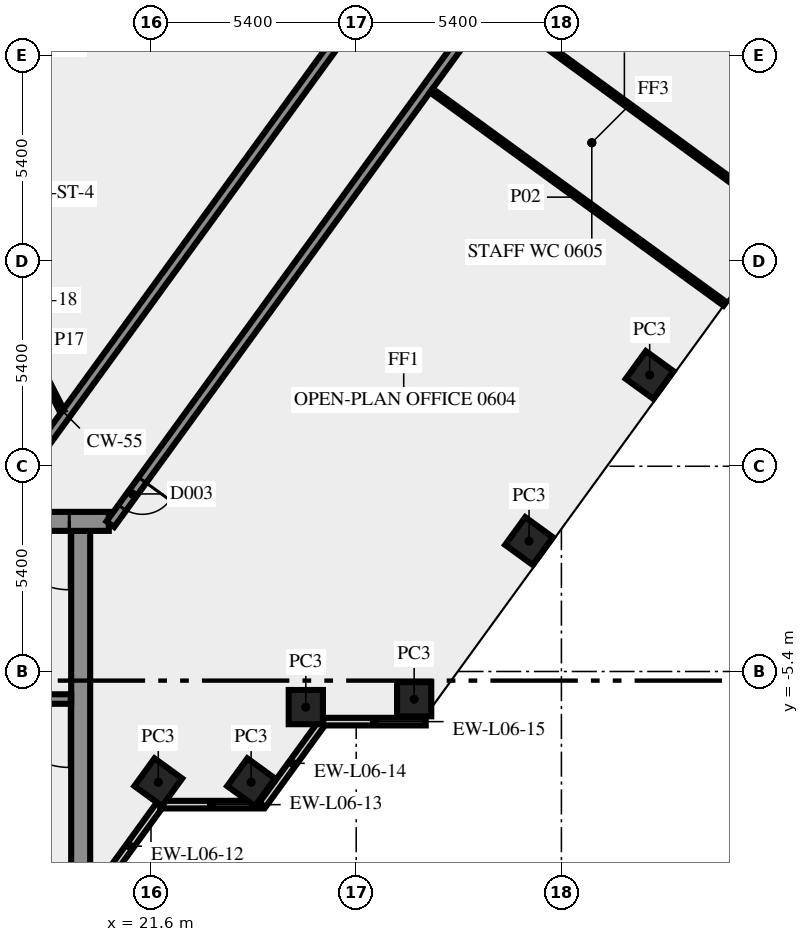
"""IFC4 building model, lengths in metres.
Left out: names, types, materials, properties, quantities, classifications, styles, units other than length and angle.
Written with IfcOpenShell. Run it as: python <this file> out.ifc"""

import sys

from ifc_helpers import new_model, si_unit, direction, frame, frame_2d, origin, origin_2d, place, context, subcontext, project, spatial, rectangle, extrude, element, fill, save


model = new_model("IFC4")
c1 = context("Model", 3, precision=1e-05, world=origin(), true_north=direction((0.0, 1.0)))
c2 = subcontext(c1, "Body", "Model", "MODEL_VIEW")
j1 = project(units=[si_unit("LENGTHUNIT", "METRE"), si_unit("PLANEANGLEUNIT", "RADIAN")], contexts=[c1])
p1 = place(None, origin())
s1 = spatial("IfcSite", under=j1, at=p1, CompositionType="ELEMENT")
p2 = place(p1, origin())
s2 = spatial("IfcBuilding", under=s1, at=p2, CompositionType="ELEMENT")
p3 = place(p2, frame((0.0, 0.0, 31.0)))
s3 = spatial("IfcBuildingStorey", under=s2, at=p3, CompositionType="ELEMENT", Elevation=31.0)
for number, where, z_axis, x_axis in (
    (1, (21.792, -8.315, 0.0), (0.0, 0.0, 1.0), (0.588, 0.809, 0.0)),
    (2, (24.235, -8.315, 0.0), (0.0, 0.0, 1.0), (0.588, 0.809, 0.0)),
    (3, (25.674, -6.337, 0.0), (0.0, 0.0, 1.0), (1.0, 0.0, 0.0)),
    (4, (28.525, -6.13, 0.0), (0.0, 0.0, 1.0), (1.0, 0.0, 0.0)),
    (5, (31.548, -1.969, 0.0), (0.0, 0.0, 1.0), (0.588, 0.809, 0.0)),
    (6, (34.722, 2.4, 0.0), (0.0, 0.0, 1.0), (0.588, 0.809, 0.0)),
):
    element("IfcColumn", number, at=place(p3, frame(where, z_axis=z_axis, x_axis=x_axis)), inside=s3, PredefinedType="COLUMN", context=c2, shape_type="SweptSolid", body=[
        extrude(rectangle(XDim=0.9, YDim=0.9, at=origin_2d()), origin(), (0.0, 0.0, 1.0), 3.65),
    ])
p4 = place(p3, frame((20.253, -11.083, 0.0), z_axis=(0.0, 0.0, 1.0), x_axis=(0.587766567315, 0.809030569476, 0.0)))
e7 = element("IfcWall", 7, at=p4, inside=s3, PredefinedType="SOLIDWALL", context=c2, shape_type="SweptSolid", body=[
    extrude(rectangle(XDim=2.688, YDim=0.2, at=frame_2d((1.344, 0.0))), origin(), (0.0, 0.0, 1.0), 3.65),
])
p5 = place(p3, frame((21.843, -8.904, 0.0), z_axis=(0.0, 0.0, 1.0), x_axis=(1.0, 0.0, 0.0)))
e8 = element("IfcWall", 8, at=p5, inside=s3, PredefinedType="SOLIDWALL", context=c2, shape_type="SweptSolid", body=[
    extrude(rectangle(XDim=2.7, YDim=0.2, at=frame_2d((1.35, 0.0))), origin(), (0.0, 0.0, 1.0), 3.65),
])
p6 = place(p3, frame((24.533, -8.909, 0.0), z_axis=(0.0, 0.0, 1.0), x_axis=(0.587720002413, 0.809064397168, 0.0)))
e9 = element("IfcWall", 9, at=p6, inside=s3, PredefinedType="SOLIDWALL", context=c2, shape_type="SweptSolid", body=[
    extrude(rectangle(XDim=2.7, YDim=0.2, at=frame_2d((1.35, 0.0))), origin(), (0.0, 0.0, 1.0), 3.65),
])
p7 = place(p3, frame((26.13, -6.719, 0.0), z_axis=(0.0, 0.0, 1.0), x_axis=(1.0, 0.0, 0.0)))
e10 = element("IfcWall", 10, at=p7, inside=s3, PredefinedType="SOLIDWALL", context=c2, shape_type="SweptSolid", body=[
    extrude(rectangle(XDim=2.7, YDim=0.2, at=frame_2d((1.35, 0.0))), origin(), (0.0, 0.0, 1.0), 3.65),
])
p8 = place(p3, frame((19.75, -10.5, 0.0), z_axis=(0.0, 0.0, 1.0), x_axis=(0.0, 1.0, 0.0)))
e11 = element("IfcWall", 11, at=p8, inside=s3, PredefinedType="SHEAR", context=c2, shape_type="SweptSolid", body=[
    extrude(rectangle(XDim=8.8, YDim=0.5, at=frame_2d((4.4, 0.0))), origin(), (0.0, 0.0, 1.0), 3.65),
])
p9 = place(p3, frame((19.5, -6.125, 0.0), z_axis=(0.0, 0.0, 1.0), x_axis=(-1.0, 0.0, 0.0)))
e12 = element("IfcWall", 12, at=p9, inside=s3, PredefinedType="SHEAR", context=c2, shape_type="SweptSolid", body=[
    extrude(rectangle(XDim=8.05, YDim=0.25, at=frame_2d((4.025, 0.0))), origin(), (0.0, 0.0, 1.0), 3.65),
])
p10 = place(p9, frame((0.05, 0.0, 0.0)))
e13 = element("IfcOpeningElement", 13, at=p10, cuts=e12, PredefinedType="OPENING", context=c2, shape_type="SweptSolid", body=[
    extrude(rectangle(XDim=1.8, YDim=2.1, at=frame_2d((0.9, 1.05))), frame((0.0, 0.135, 0.0), z_axis=(0.0, -1.0, 0.0), x_axis=(1.0, 0.0, 0.0)), (0.0, 0.0, 1.0), 0.27),
])
p11 = place(p3, frame((20.49, -1.45, 0.0), z_axis=(0.0, 0.0, 1.0), x_axis=(-1.0, 0.0, 0.0)))
e14 = element("IfcWall", 14, at=p11, inside=s3, PredefinedType="SHEAR", context=c2, shape_type="SweptSolid", body=[
    extrude(rectangle(XDim=40.98, YDim=0.5, at=frame_2d((20.49, 0.0))), origin(), (0.0, 0.0, 1.0), 3.65),
])
p12 = place(p11, frame((38.14, 0.0, 0.0)))
e15 = element("IfcOpeningElement", 15, at=p12, cuts=e14, PredefinedType="OPENING", context=c2, shape_type="SweptSolid", body=[
    extrude(rectangle(XDim=1.8, YDim=2.1, at=frame_2d((0.9, 1.05))), frame((0.0, 0.26, 0.0), z_axis=(0.0, -1.0, 0.0), x_axis=(1.0, 0.0, 0.0)), (0.0, 0.0, 1.0), 0.52),
])
p13 = place(p11, frame((36.728, 0.0, 0.0)))
e16 = element("IfcOpeningElement", 16, at=p13, cuts=e14, PredefinedType="OPENING", context=c2, shape_type="SweptSolid", body=[
    extrude(rectangle(XDim=0.8, YDim=2.1, at=frame_2d((0.4, 1.05))), frame((0.0, 0.26, 0.0), z_axis=(0.0, -1.0, 0.0), x_axis=(1.0, 0.0, 0.0)), (0.0, 0.0, 1.0), 0.52),
])
p14 = place(p11, frame((35.153, 0.0, 0.0)))
e17 = element("IfcOpeningElement", 17, at=p14, cuts=e14, PredefinedType="OPENING", context=c2, shape_type="SweptSolid", body=[
    extrude(rectangle(XDim=0.8, YDim=2.1, at=frame_2d((0.4, 1.05))), frame((0.0, 0.26, 0.0), z_axis=(0.0, -1.0, 0.0), x_axis=(1.0, 0.0, 0.0)), (0.0, 0.0, 1.0), 0.52),
])
p15 = place(p11, frame((32.94, 0.0, 0.0)))
e18 = element("IfcOpeningElement", 18, at=p15, cuts=e14, PredefinedType="OPENING", context=c2, shape_type="SweptSolid", body=[
    extrude(rectangle(XDim=0.9, YDim=2.1, at=frame_2d((0.45, 1.05))), frame((0.0, 0.26, 0.0), z_axis=(0.0, -1.0, 0.0), x_axis=(1.0, 0.0, 0.0)), (0.0, 0.0, 1.0), 0.52),
])
p16 = place(p11, frame((21.765, 0.0, 0.0)))
e19 = element("IfcOpeningElement", 19, at=p16, cuts=e14, PredefinedType="OPENING", context=c2, shape_type="SweptSolid", body=[
    extrude(rectangle(XDim=2.0, YDim=2.1, at=frame_2d((1.0, 1.05))), frame((0.0, 0.26, 0.0), z_axis=(0.0, -1.0, 0.0), x_axis=(1.0, 0.0, 0.0)), (0.0, 0.0, 1.0), 0.52),
])
p17 = place(p11, frame((7.14, 0.0, 0.0)))
e20 = element("IfcOpeningElement", 20, at=p17, cuts=e14, PredefinedType="OPENING", context=c2, shape_type="SweptSolid", body=[
    extrude(rectangle(XDim=0.9, YDim=2.1, at=frame_2d((0.45, 1.05))), frame((0.0, 0.26, 0.0), z_axis=(0.0, -1.0, 0.0), x_axis=(1.0, 0.0, 0.0)), (0.0, 0.0, 1.0), 0.52),
])
p18 = place(p11, frame((4.19, 0.0, 0.0)))
e21 = element("IfcOpeningElement", 21, at=p18, cuts=e14, PredefinedType="OPENING", context=c2, shape_type="SweptSolid", body=[
    extrude(rectangle(XDim=0.9, YDim=2.1, at=frame_2d((0.45, 1.05))), frame((0.0, 0.26, 0.0), z_axis=(0.0, -1.0, 0.0), x_axis=(1.0, 0.0, 0.0)), (0.0, 0.0, 1.0), 0.52),
])
p19 = place(p11, frame((1.04, 0.0, 0.0)))
e22 = element("IfcOpeningElement", 22, at=p19, cuts=e14, PredefinedType="OPENING", context=c2, shape_type="SweptSolid", body=[
    extrude(rectangle(XDim=1.8, YDim=2.1, at=frame_2d((0.9, 1.05))), frame((0.0, 0.26, 0.0), z_axis=(0.0, -1.0, 0.0), x_axis=(1.0, 0.0, 0.0)), (0.0, 0.0, 1.0), 0.52),
])
p20 = place(p3, frame((17.545, -1.125, 0.0), z_axis=(0.0, 0.0, 1.0), x_axis=(0.587786323093, 0.809016216391, 0.0)))
e23 = element("IfcWall", 23, at=p20, inside=s3, PredefinedType="SOLIDWALL", context=c2, shape_type="SweptSolid", body=[
    extrude(rectangle(XDim=33.493, YDim=0.25, at=frame_2d((16.747, 0.0))), origin(), (0.0, 0.0, 1.0), 3.65),
])
p21 = place(p20, frame((25.857, 0.0, 0.0)))
e24 = element("IfcOpeningElement", 24, at=p21, cuts=e23, PredefinedType="OPENING", context=c2, shape_type="SweptSolid", body=[
    extrude(rectangle(XDim=0.9, YDim=2.1, at=frame_2d((0.45, 1.05))), frame((0.0, 0.135, 0.0), z_axis=(0.0, -1.0, 0.0), x_axis=(1.0, 0.0, 0.0)), (0.0, 0.0, 1.0), 0.27),
])
p22 = place(p20, frame((24.157, 0.0, 0.0)))
e25 = element("IfcOpeningElement", 25, at=p22, cuts=e23, PredefinedType="OPENING", context=c2, shape_type="SweptSolid", body=[
    extrude(rectangle(XDim=1.0, YDim=2.1, at=frame_2d((0.5, 1.05))), frame((0.0, 0.135, 0.0), z_axis=(0.0, -1.0, 0.0), x_axis=(1.0, 0.0, 0.0)), (0.0, 0.0, 1.0), 0.27),
])
p23 = place(p3, frame((43.467, 30.045, 0.0), z_axis=(0.0, 0.0, 1.0), x_axis=(-0.587784726077, -0.809017376692, 0.0)))
e26 = element("IfcWall", 26, at=p23, inside=s3, PredefinedType="SOLIDWALL", context=c2, shape_type="SweptSolid", body=[
    extrude(rectangle(XDim=39.02, YDim=0.25, at=frame_2d((19.51, 0.0))), origin(), (0.0, 0.0, 1.0), 3.65),
])
p24 = place(p23, frame((37.588, 0.0, 0.0)))
e27 = element("IfcOpeningElement", 27, at=p24, cuts=e26, PredefinedType="OPENING", context=c2, shape_type="SweptSolid", body=[
    extrude(rectangle(XDim=0.9, YDim=2.1, at=frame_2d((0.45, 1.05))), frame((0.0, 0.135, 0.0), z_axis=(0.0, -1.0, 0.0), x_axis=(1.0, 0.0, 0.0)), (0.0, 0.0, 1.0), 0.27),
])
p25 = place(p23, frame((20.855, 0.0, 0.0)))
e28 = element("IfcOpeningElement", 28, at=p25, cuts=e26, PredefinedType="OPENING", context=c2, shape_type="SweptSolid", body=[
    extrude(rectangle(XDim=0.9, YDim=2.1, at=frame_2d((0.45, 1.05))), frame((0.0, 0.135, 0.0), z_axis=(0.0, -1.0, 0.0), x_axis=(1.0, 0.0, 0.0)), (0.0, 0.0, 1.0), 0.27),
])
p26 = place(p23, frame((7.355, 0.0, 0.0)))
e29 = element("IfcOpeningElement", 29, at=p26, cuts=e26, PredefinedType="OPENING", context=c2, shape_type="SweptSolid", body=[
    extrude(rectangle(XDim=0.9, YDim=2.1, at=frame_2d((0.45, 1.05))), frame((0.0, 0.135, 0.0), z_axis=(0.0, -1.0, 0.0), x_axis=(1.0, 0.0, 0.0)), (0.0, 0.0, 1.0), 0.27),
])
p27 = place(p23, frame((11.404, 0.0, 0.0)))
e30 = element("IfcOpeningElement", 30, at=p27, cuts=e26, PredefinedType="OPENING", context=c2, shape_type="SweptSolid", body=[
    extrude(rectangle(XDim=0.9, YDim=2.1, at=frame_2d((0.45, 1.05))), frame((0.0, 0.135, 0.0), z_axis=(0.0, -1.0, 0.0), x_axis=(1.0, 0.0, 0.0)), (0.0, 0.0, 1.0), 0.27),
])
p28 = place(p23, frame((0.604, 0.0, 0.0)))
e31 = element("IfcOpeningElement", 31, at=p28, cuts=e26, PredefinedType="OPENING", context=c2, shape_type="SweptSolid", body=[
    extrude(rectangle(XDim=0.9, YDim=2.1, at=frame_2d((0.45, 1.05))), frame((0.0, 0.135, 0.0), z_axis=(0.0, -1.0, 0.0), x_axis=(1.0, 0.0, 0.0)), (0.0, 0.0, 1.0), 0.27),
])
p29 = place(p23, frame((22.455, 0.0, 0.0)))
e32 = element("IfcOpeningElement", 32, at=p29, cuts=e26, PredefinedType="OPENING", context=c2, shape_type="SweptSolid", body=[
    extrude(rectangle(XDim=0.9, YDim=2.1, at=frame_2d((0.45, 1.05))), frame((0.0, 0.135, 0.0), z_axis=(0.0, -1.0, 0.0), x_axis=(1.0, 0.0, 0.0)), (0.0, 0.0, 1.0), 0.27),
])
p30 = place(p3, frame((36.702, 4.274, 0.0), z_axis=(0.0, 0.0, 1.0), x_axis=(-0.808998008689, 0.58781138296, 0.0)))
e33 = element("IfcWall", 33, at=p30, inside=s3, PredefinedType="PARTITIONING", context=c2, shape_type="SweptSolid", body=[
    extrude(rectangle(XDim=9.55, YDim=0.12, at=frame_2d((4.775, 0.0))), origin(), (0.0, 0.0, 1.0), 2.75),
])
p31 = place(p3, frame((30.587, 12.104, 0.0), z_axis=(0.0, 0.0, 1.0), x_axis=(0.807590933527, -0.589743066161, 0.0)))
e34 = element("IfcWall", 34, at=p31, inside=s3, PredefinedType="PARTITIONING", context=c2, shape_type="SweptSolid", body=[
    extrude(rectangle(XDim=8.594, YDim=0.12, at=frame_2d((4.297, 0.0))), origin(), (0.0, 0.0, 1.0), 3.65),
])
p32 = place(p3, frame((18.0, 3.925, 0.0), z_axis=(0.0, 0.0, 1.0), x_axis=(0.453950796792, -0.891026752736, 0.0)))
e35 = element("IfcWall", 35, at=p32, inside=s3, PredefinedType="PARTITIONING", context=c2, shape_type="SweptSolid", body=[
    extrude(rectangle(XDim=2.778, YDim=0.12, at=frame_2d((1.389, 0.0))), origin(), (0.0, 0.0, 1.0), 3.65),
])
p33 = place(p10, origin())
e36 = element("IfcDoor", 36, at=p33, inside=s3, OperationType="DOUBLE_DOOR_SINGLE_SWING", PredefinedType="DOOR", context=c2, shape_type="SweptSolid", body=[
    extrude(rectangle(XDim=1.8, YDim=2.1, at=frame_2d((0.9, 1.05))), frame((0.0, 0.025, 0.0), z_axis=(0.0, -1.0, 0.0), x_axis=(1.0, 0.0, 0.0)), (0.0, 0.0, 1.0), 0.05),
])
fill(e13, e36)
p34 = place(p19, origin())
e37 = element("IfcDoor", 37, at=p34, inside=s3, OperationType="DOUBLE_DOOR_SINGLE_SWING", PredefinedType="DOOR", context=c2, shape_type="SweptSolid", body=[
    extrude(rectangle(XDim=1.8, YDim=2.1, at=frame_2d((0.9, 1.05))), frame((0.0, 0.025, 0.0), z_axis=(0.0, -1.0, 0.0), x_axis=(1.0, 0.0, 0.0)), (0.0, 0.0, 1.0), 0.05),
])
fill(e22, e37)
p35 = place(p24, origin())
e38 = element("IfcDoor", 38, at=p35, inside=s3, OperationType="SINGLE_SWING_RIGHT", PredefinedType="DOOR", context=c2, shape_type="SweptSolid", body=[
    extrude(rectangle(XDim=0.9, YDim=2.1, at=frame_2d((0.45, 1.05))), frame((0.0, 0.025, 0.0), z_axis=(0.0, -1.0, 0.0), x_axis=(1.0, 0.0, 0.0)), (0.0, 0.0, 1.0), 0.05),
])
fill(e27, e38)
save(model, sys.argv[1])
